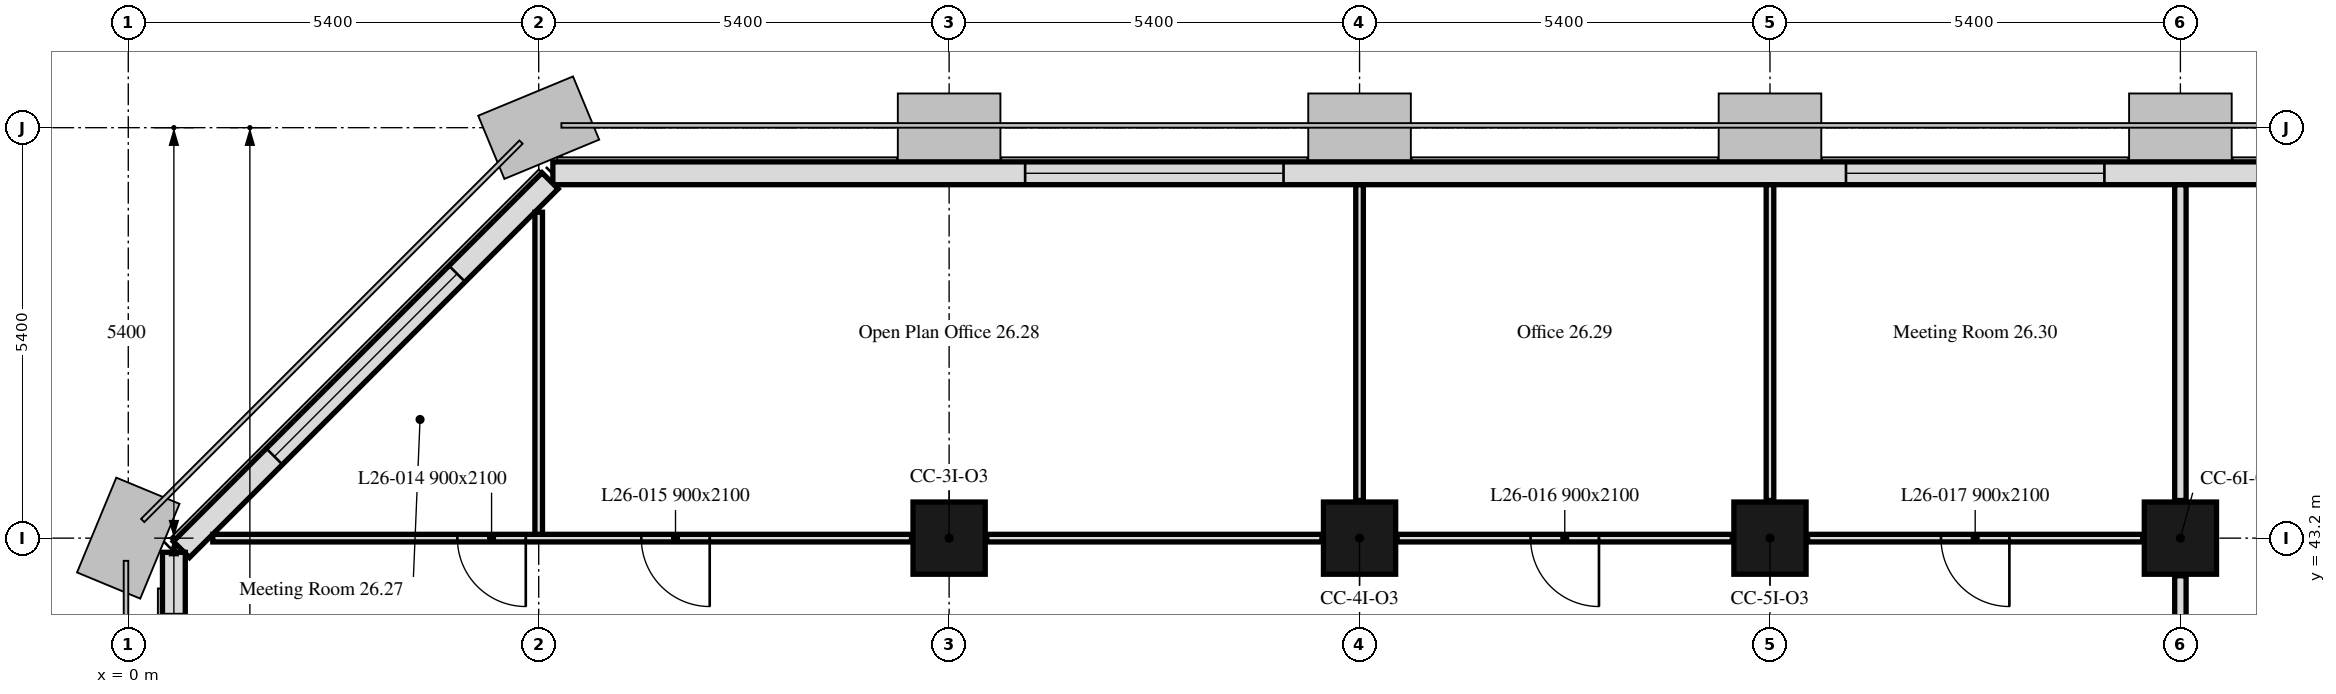
"""IFC4 building model, lengths in metres.
Left out: names, types, materials, properties, quantities, classifications, styles, units other than length and angle.
Written with IfcOpenShell. Run it as: python <this file> out.ifc"""

import sys

from ifc_helpers import new_model, si_unit, direction, frame, frame_2d, origin, origin_2d, place, context, subcontext, project, spatial, rectangle, extrude, element, fill, save


model = new_model("IFC4")
c1 = context("Model", 3, precision=1e-05, world=origin(), true_north=direction((0.0, 1.0)))
c2 = subcontext(c1, "Body", "Model", "MODEL_VIEW")
j1 = project(units=[si_unit("LENGTHUNIT", "METRE"), si_unit("PLANEANGLEUNIT", "RADIAN")], contexts=[c1])
p1 = place(None, origin())
s1 = spatial("IfcSite", under=j1, at=p1, CompositionType="ELEMENT")
p2 = place(p1, origin())
s2 = spatial("IfcBuilding", under=s1, at=p2, CompositionType="ELEMENT")
p3 = place(p2, frame((0.0, 0.0, 110.6)))
s3 = spatial("IfcBuildingStorey", under=s2, at=p3, CompositionType="ELEMENT", Elevation=110.6)
for number, where, z_axis, x_axis in (
    (1, (10.8, 43.2, 0.0), (0.0, 0.0, 1.0), (1.0, 0.0, 0.0)),
    (2, (16.2, 43.2, 0.0), (0.0, 0.0, 1.0), (1.0, 0.0, 0.0)),
    (3, (21.6, 43.2, 0.0), (0.0, 0.0, 1.0), (1.0, 0.0, 0.0)),
    (4, (27.0, 43.2, 0.0), (0.0, 0.0, 1.0), (1.0, 0.0, 0.0)),
):
    element("IfcColumn", number, at=place(p3, frame(where, z_axis=z_axis, x_axis=x_axis)), inside=s3, PredefinedType="COLUMN", context=c2, shape_type="SweptSolid", body=[
        extrude(rectangle(XDim=0.95, YDim=0.95, at=origin_2d()), origin(), (0.0, 0.0, 1.0), 3.5),
    ])
p4 = place(p3, frame((37.614, 48.0, 0.0), z_axis=(0.0, 0.0, 1.0), x_axis=(-1.0, 0.0, 0.0)))
e5 = element("IfcWall", 5, at=p4, inside=s3, PredefinedType="SOLIDWALL", context=c2, shape_type="SweptSolid", body=[
    extrude(rectangle(XDim=32.027, YDim=0.3, at=frame_2d((16.014, 0.0))), origin(), (0.0, 0.0, 1.0), 3.5),
])
p5 = place(p4, frame((0.814, 0.0, 0.9)))
e6 = element("IfcOpeningElement", 6, at=p5, cuts=e5, PredefinedType="OPENING", context=c2, shape_type="SweptSolid", body=[
    extrude(rectangle(XDim=3.4, YDim=1.7, at=frame_2d((1.7, 0.85))), frame((0.0, 0.16, 0.0), z_axis=(0.0, -1.0, 0.0), x_axis=(1.0, 0.0, 0.0)), (0.0, 0.0, 1.0), 0.32),
])
p6 = place(p4, frame((11.614, 0.0, 0.9)))
e7 = element("IfcOpeningElement", 7, at=p6, cuts=e5, PredefinedType="OPENING", context=c2, shape_type="SweptSolid", body=[
    extrude(rectangle(XDim=3.4, YDim=1.7, at=frame_2d((1.7, 0.85))), frame((0.0, 0.16, 0.0), z_axis=(0.0, -1.0, 0.0), x_axis=(1.0, 0.0, 0.0)), (0.0, 0.0, 1.0), 0.32),
])
p7 = place(p4, frame((22.414, 0.0, 0.9)))
e8 = element("IfcOpeningElement", 8, at=p7, cuts=e5, PredefinedType="OPENING", context=c2, shape_type="SweptSolid", body=[
    extrude(rectangle(XDim=3.4, YDim=1.7, at=frame_2d((1.7, 0.85))), frame((0.0, 0.16, 0.0), z_axis=(0.0, -1.0, 0.0), x_axis=(1.0, 0.0, 0.0)), (0.0, 0.0, 1.0), 0.32),
])
p8 = place(p3, frame((5.55, 47.901, 0.0), z_axis=(0.0, 0.0, 1.0), x_axis=(-0.707106781187, -0.707106781187, 0.0)))
e9 = element("IfcWall", 9, at=p8, inside=s3, PredefinedType="SOLIDWALL", context=c2, shape_type="SweptSolid", body=[
    extrude(rectangle(XDim=6.86, YDim=0.3, at=frame_2d((3.43, 0.0))), origin(), (0.0, 0.0, 1.0), 3.5),
])
p9 = place(p8, frame((1.73, 0.0, 0.9)))
e10 = element("IfcOpeningElement", 10, at=p9, cuts=e9, PredefinedType="OPENING", context=c2, shape_type="SweptSolid", body=[
    extrude(rectangle(XDim=3.4, YDim=1.7, at=frame_2d((1.7, 0.85))), frame((0.0, 0.16, 0.0), z_axis=(0.0, -1.0, 0.0), x_axis=(1.0, 0.0, 0.0)), (0.0, 0.0, 1.0), 0.32),
])
p10 = place(p3, frame((0.6, 43.014, 0.0), z_axis=(0.0, 0.0, 1.0), x_axis=(0.0, -1.0, 0.0)))
e11 = element("IfcWall", 11, at=p10, inside=s3, PredefinedType="SOLIDWALL", context=c2, shape_type="SweptSolid", body=[
    extrude(rectangle(XDim=32.027, YDim=0.3, at=frame_2d((16.014, 0.0))), origin(), (0.0, 0.0, 1.0), 3.5),
])
p11 = place(p10, frame((0.814, 0.0, 0.9)))
e12 = element("IfcOpeningElement", 12, at=p11, cuts=e11, PredefinedType="OPENING", context=c2, shape_type="SweptSolid", body=[
    extrude(rectangle(XDim=3.4, YDim=1.7, at=frame_2d((1.7, 0.85))), frame((0.0, 0.16, 0.0), z_axis=(0.0, -1.0, 0.0), x_axis=(1.0, 0.0, 0.0)), (0.0, 0.0, 1.0), 0.32),
])
p12 = place(p10, frame((11.614, 0.0, 0.9)))
e13 = element("IfcOpeningElement", 13, at=p12, cuts=e11, PredefinedType="OPENING", context=c2, shape_type="SweptSolid", body=[
    extrude(rectangle(XDim=3.4, YDim=1.7, at=frame_2d((1.7, 0.85))), frame((0.0, 0.16, 0.0), z_axis=(0.0, -1.0, 0.0), x_axis=(1.0, 0.0, 0.0)), (0.0, 0.0, 1.0), 0.32),
])
p13 = place(p10, frame((22.414, 0.0, 0.9)))
e14 = element("IfcOpeningElement", 14, at=p13, cuts=e11, PredefinedType="OPENING", context=c2, shape_type="SweptSolid", body=[
    extrude(rectangle(XDim=3.4, YDim=1.7, at=frame_2d((1.7, 0.85))), frame((0.0, 0.16, 0.0), z_axis=(0.0, -1.0, 0.0), x_axis=(1.0, 0.0, 0.0)), (0.0, 0.0, 1.0), 0.32),
])
p14 = place(p3, frame((26.505, 43.2, 0.0), z_axis=(0.0, 0.0, 1.0), x_axis=(-1.0, 0.0, 0.0)))
e15 = element("IfcWall", 15, at=p14, inside=s3, PredefinedType="PARTITIONING", context=c2, shape_type="SweptSolid", body=[
    extrude(rectangle(XDim=4.41, YDim=0.1, at=frame_2d((2.205, 0.0))), origin(), (0.0, 0.0, 1.0), 3.5),
])
p15 = place(p14, frame((1.755, 0.0, 0.0)))
e16 = element("IfcOpeningElement", 16, at=p15, cuts=e15, PredefinedType="OPENING", context=c2, shape_type="SweptSolid", body=[
    extrude(rectangle(XDim=0.9, YDim=2.1, at=frame_2d((0.45, 1.05))), frame((0.0, 0.05, 0.0), z_axis=(0.0, -1.0, 0.0), x_axis=(1.0, 0.0, 0.0)), (0.0, 0.0, 1.0), 0.1),
])
p16 = place(p3, frame((21.105, 43.2, 0.0), z_axis=(0.0, 0.0, 1.0), x_axis=(-1.0, 0.0, 0.0)))
e17 = element("IfcWall", 17, at=p16, inside=s3, PredefinedType="PARTITIONING", context=c2, shape_type="SweptSolid", body=[
    extrude(rectangle(XDim=4.41, YDim=0.1, at=frame_2d((2.205, 0.0))), origin(), (0.0, 0.0, 1.0), 3.5),
])
p17 = place(p16, frame((1.755, 0.0, 0.0)))
e18 = element("IfcOpeningElement", 18, at=p17, cuts=e17, PredefinedType="OPENING", context=c2, shape_type="SweptSolid", body=[
    extrude(rectangle(XDim=0.9, YDim=2.1, at=frame_2d((0.45, 1.05))), frame((0.0, 0.05, 0.0), z_axis=(0.0, -1.0, 0.0), x_axis=(1.0, 0.0, 0.0)), (0.0, 0.0, 1.0), 0.1),
])
p18 = place(p3, frame((15.705, 43.2, 0.0), z_axis=(0.0, 0.0, 1.0), x_axis=(-1.0, 0.0, 0.0)))
e19 = element("IfcWall", 19, at=p18, inside=s3, PredefinedType="PARTITIONING", context=c2, shape_type="SweptSolid", body=[
    extrude(rectangle(XDim=4.41, YDim=0.1, at=frame_2d((2.205, 0.0))), origin(), (0.0, 0.0, 1.0), 3.5),
])
p19 = place(p3, frame((10.305, 43.2, 0.0), z_axis=(0.0, 0.0, 1.0), x_axis=(-1.0, 0.0, 0.0)))
e20 = element("IfcWall", 20, at=p19, inside=s3, PredefinedType="PARTITIONING", context=c2, shape_type="SweptSolid", body=[
    extrude(rectangle(XDim=9.193, YDim=0.1, at=frame_2d((4.596, 0.0))), origin(), (0.0, 0.0, 1.0), 3.5),
])
p20 = place(p19, frame((5.075, 0.0, 0.0)))
e21 = element("IfcOpeningElement", 21, at=p20, cuts=e20, PredefinedType="OPENING", context=c2, shape_type="SweptSolid", body=[
    extrude(rectangle(XDim=0.9, YDim=2.1, at=frame_2d((0.45, 1.05))), frame((0.0, 0.05, 0.0), z_axis=(0.0, -1.0, 0.0), x_axis=(1.0, 0.0, 0.0)), (0.0, 0.0, 1.0), 0.1),
])
p21 = place(p19, frame((2.655, 0.0, 0.0)))
e22 = element("IfcOpeningElement", 22, at=p21, cuts=e20, PredefinedType="OPENING", context=c2, shape_type="SweptSolid", body=[
    extrude(rectangle(XDim=0.9, YDim=2.1, at=frame_2d((0.45, 1.05))), frame((0.0, 0.05, 0.0), z_axis=(0.0, -1.0, 0.0), x_axis=(1.0, 0.0, 0.0)), (0.0, 0.0, 1.0), 0.1),
])
p22 = place(p3, frame((27.0, 38.295, 0.0), z_axis=(0.0, 0.0, 1.0), x_axis=(0.0, 1.0, 0.0)))
e23 = element("IfcWall", 23, at=p22, inside=s3, PredefinedType="PARTITIONING", context=c2, shape_type="SweptSolid", body=[
    extrude(rectangle(XDim=4.41, YDim=0.15, at=frame_2d((2.205, 0.0))), origin(), (0.0, 0.0, 1.0), 2.75),
])
p23 = place(p3, frame((5.4, 43.25, 0.0), z_axis=(0.0, 0.0, 1.0), x_axis=(0.0, 1.0, 0.0)))
e24 = element("IfcWall", 24, at=p23, inside=s3, PredefinedType="PARTITIONING", context=c2, shape_type="SweptSolid", body=[
    extrude(rectangle(XDim=4.238, YDim=0.1, at=frame_2d((2.119, 0.0))), origin(), (0.0, 0.0, 1.0), 3.5),
])
for number, where, z_axis, x_axis in (
    (25, (16.2, 43.695, 0.0), (0.0, 0.0, 1.0), (0.0, 1.0, 0.0)),
    (26, (21.6, 43.695, 0.0), (0.0, 0.0, 1.0), (0.0, 1.0, 0.0)),
):
    element("IfcWall", number, at=place(p3, frame(where, z_axis=z_axis, x_axis=x_axis)), inside=s3, PredefinedType="PARTITIONING", context=c2, shape_type="SweptSolid", body=[
        extrude(rectangle(XDim=4.154, YDim=0.1, at=frame_2d((2.077, 0.0))), origin(), (0.0, 0.0, 1.0), 2.75),
    ])
p24 = place(p3, frame((27.0, 43.695, 0.0), z_axis=(0.0, 0.0, 1.0), x_axis=(0.0, 1.0, 0.0)))
e27 = element("IfcWall", 27, at=p24, inside=s3, PredefinedType="PARTITIONING", context=c2, shape_type="SweptSolid", body=[
    extrude(rectangle(XDim=4.154, YDim=0.15, at=frame_2d((2.077, 0.0))), origin(), (0.0, 0.0, 1.0), 2.75),
])
p25 = place(p6, origin())
e28 = element("IfcWindow", 28, at=p25, inside=s3, PartitioningType="SINGLE_PANEL", PredefinedType="WINDOW", context=c2, shape_type="SweptSolid", body=[
    extrude(rectangle(XDim=3.4, YDim=1.7, at=frame_2d((1.7, 0.85))), frame((0.0, 0.03, 0.0), z_axis=(0.0, -1.0, 0.0), x_axis=(1.0, 0.0, 0.0)), (0.0, 0.0, 1.0), 0.06),
])
fill(e7, e28)
p26 = place(p7, origin())
e29 = element("IfcWindow", 29, at=p26, inside=s3, PartitioningType="SINGLE_PANEL", PredefinedType="WINDOW", context=c2, shape_type="SweptSolid", body=[
    extrude(rectangle(XDim=3.4, YDim=1.7, at=frame_2d((1.7, 0.85))), frame((0.0, 0.03, 0.0), z_axis=(0.0, -1.0, 0.0), x_axis=(1.0, 0.0, 0.0)), (0.0, 0.0, 1.0), 0.06),
])
fill(e8, e29)
p27 = place(p9, origin())
e30 = element("IfcWindow", 30, at=p27, inside=s3, PartitioningType="SINGLE_PANEL", PredefinedType="WINDOW", context=c2, shape_type="SweptSolid", body=[
    extrude(rectangle(XDim=3.4, YDim=1.7, at=frame_2d((1.7, 0.85))), frame((0.0, 0.03, 0.0), z_axis=(0.0, -1.0, 0.0), x_axis=(1.0, 0.0, 0.0)), (0.0, 0.0, 1.0), 0.06),
])
fill(e10, e30)
p28 = place(p20, origin())
e31 = element("IfcDoor", 31, at=p28, inside=s3, OperationType="SINGLE_SWING_LEFT", PredefinedType="DOOR", context=c2, shape_type="SweptSolid", body=[
    extrude(rectangle(XDim=0.9, YDim=2.1, at=frame_2d((0.45, 1.05))), frame((0.0, 0.025, 0.0), z_axis=(0.0, -1.0, 0.0), x_axis=(1.0, 0.0, 0.0)), (0.0, 0.0, 1.0), 0.05),
])
fill(e21, e31)
p29 = place(p21, origin())
e32 = element("IfcDoor", 32, at=p29, inside=s3, OperationType="SINGLE_SWING_LEFT", PredefinedType="DOOR", context=c2, shape_type="SweptSolid", body=[
    extrude(rectangle(XDim=0.9, YDim=2.1, at=frame_2d((0.45, 1.05))), frame((0.0, 0.025, 0.0), z_axis=(0.0, -1.0, 0.0), x_axis=(1.0, 0.0, 0.0)), (0.0, 0.0, 1.0), 0.05),
])
fill(e22, e32)
p30 = place(p17, origin())
e33 = element("IfcDoor", 33, at=p30, inside=s3, OperationType="SINGLE_SWING_LEFT", PredefinedType="DOOR", context=c2, shape_type="SweptSolid", body=[
    extrude(rectangle(XDim=0.9, YDim=2.1, at=frame_2d((0.45, 1.05))), frame((0.0, 0.025, 0.0), z_axis=(0.0, -1.0, 0.0), x_axis=(1.0, 0.0, 0.0)), (0.0, 0.0, 1.0), 0.05),
])
fill(e18, e33)
p31 = place(p15, origin())
e34 = element("IfcDoor", 34, at=p31, inside=s3, OperationType="SINGLE_SWING_LEFT", PredefinedType="DOOR", context=c2, shape_type="SweptSolid", body=[
    extrude(rectangle(XDim=0.9, YDim=2.1, at=frame_2d((0.45, 1.05))), frame((0.0, 0.025, 0.0), z_axis=(0.0, -1.0, 0.0), x_axis=(1.0, 0.0, 0.0)), (0.0, 0.0, 1.0), 0.05),
])
fill(e16, e34)
save(model, sys.argv[1])
